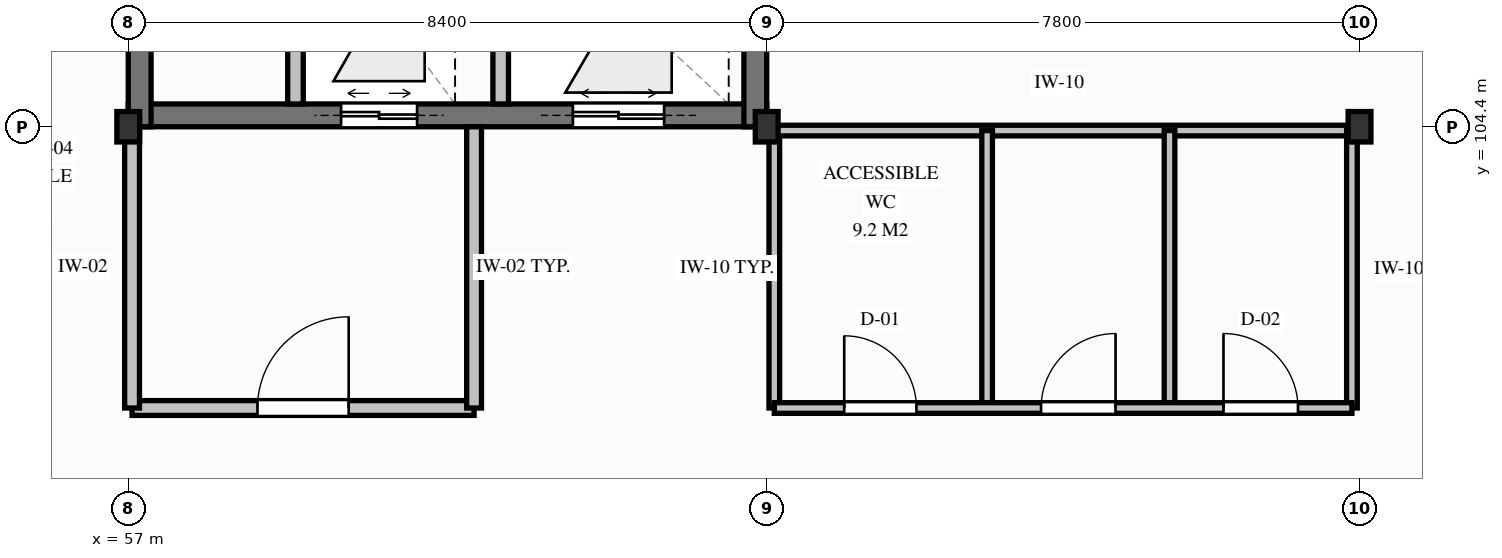
"""IFC4 building model, lengths in metres.
Left out: names, types, materials, properties, quantities, classifications, styles, units other than length and angle.
Written with IfcOpenShell. Run it as: python <this file> out.ifc"""

import sys

from ifc_helpers import new_model, si_unit, direction, frame, frame_2d, origin, origin_2d, place, context, subcontext, project, spatial, rectangle, i_section, extrude, element, fill, save


model = new_model("IFC4")
c1 = context("Model", 3, precision=1e-05, world=origin(), true_north=direction((0.0, 1.0)))
c2 = subcontext(c1, "Body", "Model", "MODEL_VIEW")
j1 = project(units=[si_unit("LENGTHUNIT", "METRE"), si_unit("PLANEANGLEUNIT", "RADIAN")], contexts=[c1])
p1 = place(None, origin())
s1 = spatial("IfcSite", under=j1, at=p1, CompositionType="ELEMENT")
p2 = place(p1, origin())
s2 = spatial("IfcBuilding", under=s1, at=p2, CompositionType="ELEMENT")
p3 = place(p2, frame((0.0, 0.0, 13.2)))
s3 = spatial("IfcBuildingStorey", under=s2, at=p3, CompositionType="ELEMENT", Elevation=13.2)
p4 = place(p3, frame((57.0, 104.55, 0.0), z_axis=(0.0, 0.0, 1.0), x_axis=(1.0, 0.0, 0.0)))
e1 = element("IfcWall", 1, at=p4, inside=s3, PredefinedType="SHEAR", context=c2, shape_type="SweptSolid", body=[
    extrude(rectangle(XDim=8.4, YDim=0.3, at=frame_2d((4.2, 0.0))), origin(), (0.0, 0.0, 1.0), 4.05),
])
p5 = place(p4, frame((2.8, 0.0, 0.0)))
e2 = element("IfcOpeningElement", 2, at=p5, cuts=e1, PredefinedType="OPENING", context=c2, shape_type="SweptSolid", body=[
    extrude(rectangle(XDim=1.0, YDim=2.1, at=frame_2d((0.5, 1.05))), frame((0.0, 0.16, 0.0), z_axis=(0.0, -1.0, 0.0), x_axis=(1.0, 0.0, 0.0)), (0.0, 0.0, 1.0), 0.32),
])
p6 = place(p4, frame((5.85, 0.0, 0.0)))
e3 = element("IfcOpeningElement", 3, at=p6, cuts=e1, PredefinedType="OPENING", context=c2, shape_type="SweptSolid", body=[
    extrude(rectangle(XDim=1.2, YDim=2.15, at=frame_2d((0.6, 1.075))), frame((0.0, 0.16, 0.0), z_axis=(0.0, -1.0, 0.0), x_axis=(1.0, 0.0, 0.0)), (0.0, 0.0, 1.0), 0.32),
])
p7 = place(p3, frame((57.15, 104.4, 0.0), z_axis=(0.0, 0.0, 1.0), x_axis=(0.0, 1.0, 0.0)))
e4 = element("IfcWall", 4, at=p7, inside=s3, PredefinedType="SHEAR", context=c2, shape_type="SweptSolid", body=[
    extrude(rectangle(XDim=7.2, YDim=0.3, at=frame_2d((3.6, 0.0))), origin(), (0.0, 0.0, 1.0), 4.05),
])
p8 = place(p7, frame((4.2, 0.0, 0.0)))
e5 = element("IfcOpeningElement", 5, at=p8, cuts=e4, PredefinedType="OPENING", context=c2, shape_type="SweptSolid", body=[
    extrude(rectangle(XDim=1.1, YDim=2.15, at=frame_2d((0.55, 1.075))), frame((0.0, 0.16, 0.0), z_axis=(0.0, -1.0, 0.0), x_axis=(1.0, 0.0, 0.0)), (0.0, 0.0, 1.0), 0.32),
])
p9 = place(p3, frame((65.25, 104.4, 0.0), z_axis=(0.0, 0.0, 1.0), x_axis=(0.0, 1.0, 0.0)))
e6 = element("IfcWall", 6, at=p9, inside=s3, PredefinedType="SHEAR", context=c2, shape_type="SweptSolid", body=[
    extrude(rectangle(XDim=7.2, YDim=0.3, at=frame_2d((3.6, 0.0))), origin(), (0.0, 0.0, 1.0), 4.05),
])
for number, where, z_axis, x_axis in (
    (7, (57.0, 104.4, 0.0), (0.0, 0.0, 1.0), (1.0, 0.0, 0.0)),
    (8, (65.4, 104.4, 0.0), (0.0, 0.0, 1.0), (1.0, 0.0, 0.0)),
    (9, (73.2, 104.4, 0.0), (0.0, 0.0, 1.0), (1.0, 0.0, 0.0)),
):
    element("IfcColumn", number, at=place(p3, frame(where, z_axis=z_axis, x_axis=x_axis)), inside=s3, PredefinedType="COLUMN", context=c2, shape_type="SweptSolid", body=[
        extrude(i_section(OverallWidth=0.3, OverallDepth=0.4, WebThickness=0.013, FlangeThickness=0.024, FilletRadius=0.027, at=origin_2d()), origin(), (0.0, 0.0, 1.0), 4.05),
    ])
for number, where, z_axis, x_axis in (
    (10, (59.2, 104.7, 0.0), (0.0, 0.0, 1.0), (0.0, 1.0, 0.0)),
    (11, (61.9, 104.7, 0.0), (0.0, 0.0, 1.0), (0.0, 1.0, 0.0)),
):
    element("IfcWall", number, at=place(p3, frame(where, z_axis=z_axis, x_axis=x_axis)), inside=s3, PredefinedType="PARTITIONING", context=c2, shape_type="SweptSolid", body=[
        extrude(rectangle(XDim=2.7, YDim=0.205, at=frame_2d((1.35, 0.0))), origin(), (0.0, 0.0, 1.0), 3.448),
    ])
p10 = place(p3, frame((65.5, 100.7, 0.0), z_axis=(0.0, 0.0, 1.0), x_axis=(0.0, 1.0, 0.0)))
e12 = element("IfcWall", 12, at=p10, inside=s3, PredefinedType="PARTITIONING", context=c2, shape_type="SweptSolid", body=[
    extrude(rectangle(XDim=3.68, YDim=0.14, at=frame_2d((1.84, 0.0))), origin(), (0.0, 0.0, 1.0), 3.438),
])
p11 = place(p3, frame((65.4, 104.35, 0.0), z_axis=(0.0, 0.0, 1.0), x_axis=(1.0, 0.0, 0.0)))
e13 = element("IfcWall", 13, at=p11, inside=s3, PredefinedType="PARTITIONING", context=c2, shape_type="SweptSolid", body=[
    extrude(rectangle(XDim=7.7, YDim=0.14, at=frame_2d((3.85, 0.0))), origin(), (0.0, 0.0, 1.0), 3.178),
])
p12 = place(p3, frame((73.1, 100.7, 0.0), z_axis=(0.0, 0.0, 1.0), x_axis=(0.0, 1.0, 0.0)))
e14 = element("IfcWall", 14, at=p12, inside=s3, PredefinedType="PARTITIONING", context=c2, shape_type="SweptSolid", body=[
    extrude(rectangle(XDim=3.65, YDim=0.14, at=frame_2d((1.825, 0.0))), origin(), (0.0, 0.0, 1.0), 3.178),
])
for number, where, z_axis, x_axis in (
    (15, (68.3, 100.7, 0.0), (0.0, 0.0, 1.0), (0.0, 1.0, 0.0)),
    (16, (70.7, 100.7, 0.0), (0.0, 0.0, 1.0), (0.0, 1.0, 0.0)),
):
    element("IfcWall", number, at=place(p3, frame(where, z_axis=z_axis, x_axis=x_axis)), inside=s3, PredefinedType="PARTITIONING", context=c2, shape_type="SweptSolid", body=[
        extrude(rectangle(XDim=3.65, YDim=0.14, at=frame_2d((1.825, 0.0))), origin(), (0.0, 0.0, 1.0), 3.478),
    ])
p13 = place(p3, frame((65.5, 100.7, 0.0), z_axis=(0.0, 0.0, 1.0), x_axis=(1.0, 0.0, 0.0)))
e17 = element("IfcWall", 17, at=p13, inside=s3, PredefinedType="PARTITIONING", context=c2, shape_type="SweptSolid", body=[
    extrude(rectangle(XDim=7.6, YDim=0.14, at=frame_2d((3.8, 0.0))), origin(), (0.0, 0.0, 1.0), 3.228),
])
p14 = place(p13, frame((0.92, 0.0, 0.0)))
e18 = element("IfcOpeningElement", 18, at=p14, cuts=e17, PredefinedType="OPENING", context=c2, shape_type="SweptSolid", body=[
    extrude(rectangle(XDim=0.95, YDim=2.12, at=frame_2d((0.475, 1.06))), frame((0.0, 0.08, 0.0), z_axis=(0.0, -1.0, 0.0), x_axis=(1.0, 0.0, 0.0)), (0.0, 0.0, 1.0), 0.16),
])
p15 = place(p13, frame((3.51, 0.0, 0.0)))
e19 = element("IfcOpeningElement", 19, at=p15, cuts=e17, PredefinedType="OPENING", context=c2, shape_type="SweptSolid", body=[
    extrude(rectangle(XDim=0.98, YDim=2.14, at=frame_2d((0.49, 1.07))), frame((0.0, 0.08, 0.0), z_axis=(0.0, -1.0, 0.0), x_axis=(1.0, 0.0, 0.0)), (0.0, 0.0, 1.0), 0.16),
])
p16 = place(p13, frame((5.91, 0.0, 0.0)))
e20 = element("IfcOpeningElement", 20, at=p16, cuts=e17, PredefinedType="OPENING", context=c2, shape_type="SweptSolid", body=[
    extrude(rectangle(XDim=0.98, YDim=2.14, at=frame_2d((0.49, 1.07))), frame((0.0, 0.08, 0.0), z_axis=(0.0, -1.0, 0.0), x_axis=(1.0, 0.0, 0.0)), (0.0, 0.0, 1.0), 0.16),
])
p17 = place(p3, frame((57.05, 100.7, 0.0), z_axis=(0.0, 0.0, 1.0), x_axis=(1.0, 0.0, 0.0)))
e21 = element("IfcWall", 21, at=p17, inside=s3, PredefinedType="PARTITIONING", context=c2, shape_type="SweptSolid", body=[
    extrude(rectangle(XDim=4.5, YDim=0.195, at=frame_2d((2.25, 0.0))), origin(), (0.0, 0.0, 1.0), 3.228),
])
p18 = place(p17, frame((1.65, 0.0, 0.0)))
e22 = element("IfcOpeningElement", 22, at=p18, cuts=e21, PredefinedType="OPENING", context=c2, shape_type="SweptSolid", body=[
    extrude(rectangle(XDim=1.2, YDim=2.15, at=frame_2d((0.6, 1.075))), frame((0.0, 0.107, 0.0), z_axis=(0.0, -1.0, 0.0), x_axis=(1.0, 0.0, 0.0)), (0.0, 0.0, 1.0), 0.215),
])
p19 = place(p3, frame((61.55, 100.7, 0.0), z_axis=(0.0, 0.0, 1.0), x_axis=(0.0, 1.0, 0.0)))
e23 = element("IfcWall", 23, at=p19, inside=s3, PredefinedType="PARTITIONING", context=c2, shape_type="SweptSolid", body=[
    extrude(rectangle(XDim=3.7, YDim=0.195, at=frame_2d((1.85, 0.0))), origin(), (0.0, 0.0, 1.0), 3.448),
])
p20 = place(p3, frame((57.05, 100.7, 0.0), z_axis=(0.0, 0.0, 1.0), x_axis=(0.0, 1.0, 0.0)))
e24 = element("IfcWall", 24, at=p20, inside=s3, PredefinedType="PARTITIONING", context=c2, shape_type="SweptSolid", body=[
    extrude(rectangle(XDim=3.7, YDim=0.195, at=frame_2d((1.85, 0.0))), origin(), (0.0, 0.0, 1.0), 3.178),
])
p21 = place(p5, origin())
e25 = element("IfcDoor", 25, at=p21, inside=s3, OperationType="DOUBLE_DOOR_SLIDING", PredefinedType="DOOR", context=c2, shape_type="SweptSolid", body=[
    extrude(rectangle(XDim=1.0, YDim=2.1, at=frame_2d((0.5, 1.05))), frame((0.0, 0.025, 0.0), z_axis=(0.0, -1.0, 0.0), x_axis=(1.0, 0.0, 0.0)), (0.0, 0.0, 1.0), 0.05),
])
fill(e2, e25)
p22 = place(p6, origin())
e26 = element("IfcDoor", 26, at=p22, inside=s3, OperationType="DOUBLE_DOOR_SLIDING", PredefinedType="DOOR", context=c2, shape_type="SweptSolid", body=[
    extrude(rectangle(XDim=1.2, YDim=2.15, at=frame_2d((0.6, 1.075))), frame((0.0, 0.025, 0.0), z_axis=(0.0, -1.0, 0.0), x_axis=(1.0, 0.0, 0.0)), (0.0, 0.0, 1.0), 0.05),
])
fill(e3, e26)
p23 = place(p14, origin())
e27 = element("IfcDoor", 27, at=p23, inside=s3, OperationType="SINGLE_SWING_LEFT", PredefinedType="DOOR", context=c2, shape_type="SweptSolid", body=[
    extrude(rectangle(XDim=0.95, YDim=2.12, at=frame_2d((0.475, 1.06))), frame((0.0, 0.025, 0.0), z_axis=(0.0, -1.0, 0.0), x_axis=(1.0, 0.0, 0.0)), (0.0, 0.0, 1.0), 0.05),
])
fill(e18, e27)
p24 = place(p15, origin())
e28 = element("IfcDoor", 28, at=p24, inside=s3, OperationType="SINGLE_SWING_RIGHT", PredefinedType="DOOR", context=c2, shape_type="SweptSolid", body=[
    extrude(rectangle(XDim=0.98, YDim=2.14, at=frame_2d((0.49, 1.07))), frame((0.0, 0.025, 0.0), z_axis=(0.0, -1.0, 0.0), x_axis=(1.0, 0.0, 0.0)), (0.0, 0.0, 1.0), 0.05),
])
fill(e19, e28)
p25 = place(p16, origin())
e29 = element("IfcDoor", 29, at=p25, inside=s3, OperationType="SINGLE_SWING_LEFT", PredefinedType="DOOR", context=c2, shape_type="SweptSolid", body=[
    extrude(rectangle(XDim=0.98, YDim=2.14, at=frame_2d((0.49, 1.07))), frame((0.0, 0.025, 0.0), z_axis=(0.0, -1.0, 0.0), x_axis=(1.0, 0.0, 0.0)), (0.0, 0.0, 1.0), 0.05),
])
fill(e20, e29)
p26 = place(p18, origin())
e30 = element("IfcDoor", 30, at=p26, inside=s3, OperationType="SINGLE_SWING_RIGHT", PredefinedType="DOOR", context=c2, shape_type="SweptSolid", body=[
    extrude(rectangle(XDim=1.2, YDim=2.15, at=frame_2d((0.6, 1.075))), frame((0.0, 0.025, 0.0), z_axis=(0.0, -1.0, 0.0), x_axis=(1.0, 0.0, 0.0)), (0.0, 0.0, 1.0), 0.05),
])
fill(e22, e30)
save(model, sys.argv[1])
